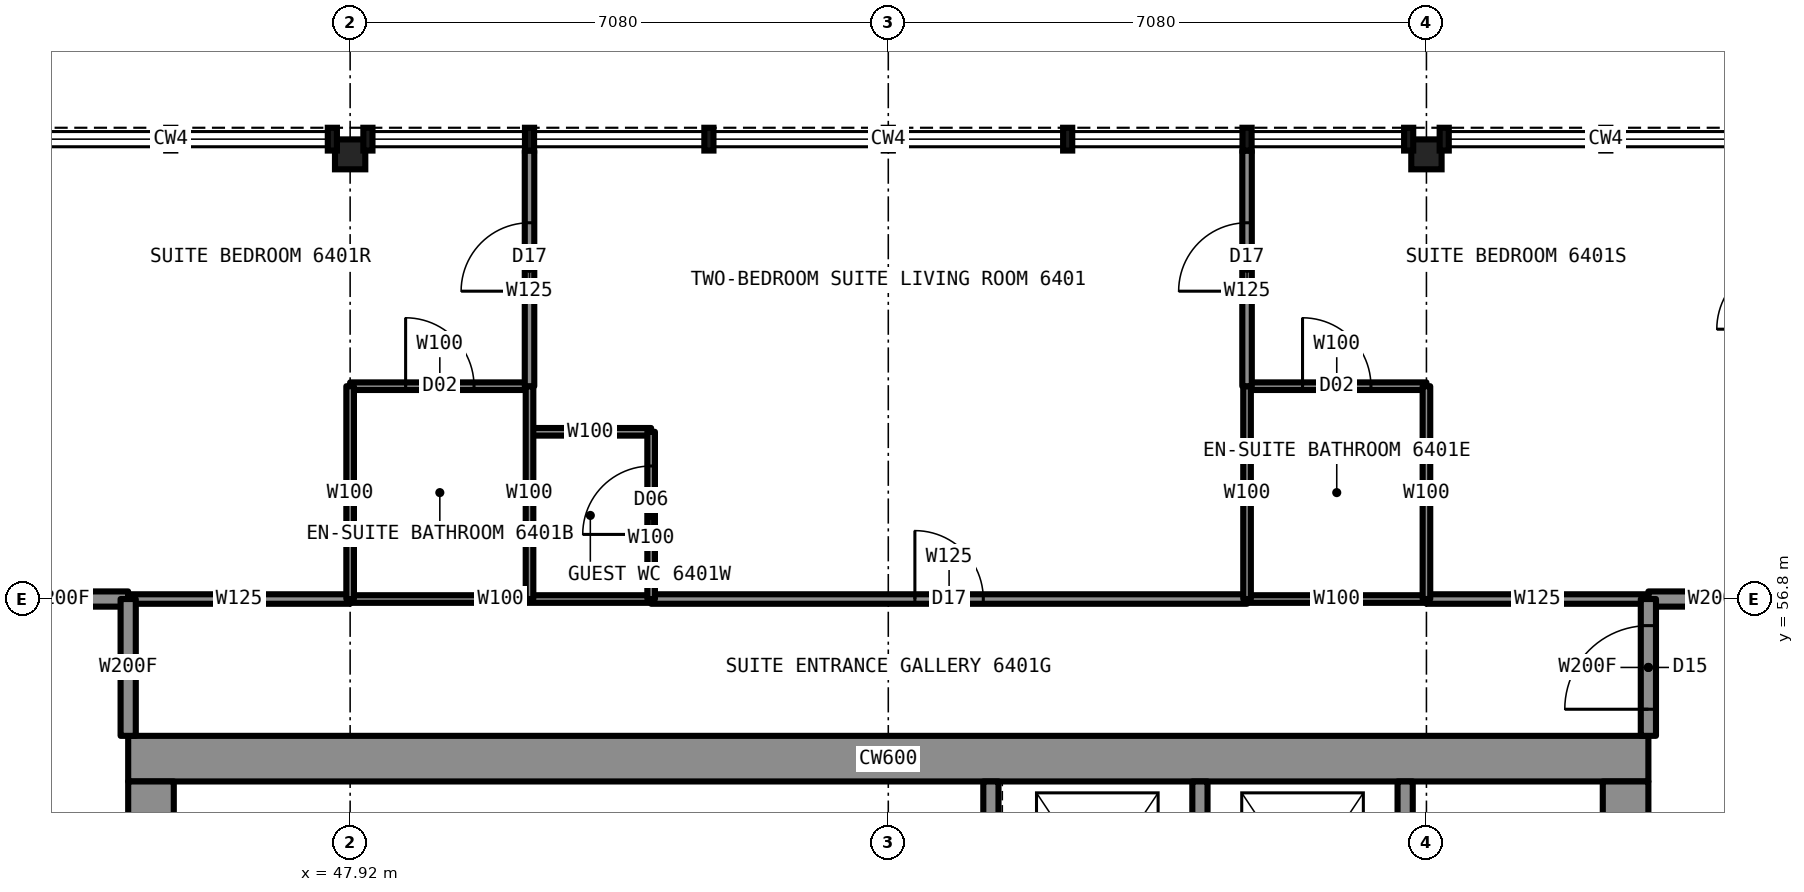
"""IFC4 building model, lengths in metres.
Left out: names, types, materials, properties, quantities, classifications, styles, units other than length and angle.
Written with IfcOpenShell. Run it as: python <this file> out.ifc"""

import sys

from ifc_helpers import new_model, si_unit, direction, frame, frame_2d, origin, origin_2d, place, context, subcontext, project, spatial, rectangle, i_section, extrude, element, fill, save


model = new_model("IFC4")
c1 = context("Model", 3, precision=1e-05, world=origin(), true_north=direction((0.0, 1.0)))
c2 = subcontext(c1, "Body", "Model", "MODEL_VIEW")
j1 = project(units=[si_unit("LENGTHUNIT", "METRE"), si_unit("PLANEANGLEUNIT", "RADIAN")], contexts=[c1])
p1 = place(None, origin())
s1 = spatial("IfcSite", under=j1, at=p1, CompositionType="ELEMENT")
p2 = place(p1, origin())
s2 = spatial("IfcBuilding", under=s1, at=p2, CompositionType="ELEMENT")
p3 = place(p2, frame((0.0, 0.0, 237.2)))
s3 = spatial("IfcBuildingStorey", under=s2, at=p3, CompositionType="ELEMENT", Elevation=237.2)
for number, where, z_axis, x_axis in (
    (1, (47.92, 62.65, 0.0), (0.0, 0.0, 1.0), (1.0, 0.0, 0.0)),
    (2, (62.08, 62.65, 0.0), (0.0, 0.0, 1.0), (1.0, 0.0, 0.0)),
):
    element("IfcColumn", number, at=place(p3, frame(where, z_axis=z_axis, x_axis=x_axis)), inside=s3, PredefinedType="COLUMN", context=c2, shape_type="SweptSolid", body=[
        extrude(i_section(OverallWidth=0.399, OverallDepth=0.394, WebThickness=0.023, FlangeThickness=0.037, at=origin_2d()), origin(), (0.0, 0.0, 1.0), 3.5),
    ])
p4 = place(p3, frame((45.0, 54.7, 0.0), z_axis=(0.0, 0.0, 1.0), x_axis=(1.0, 0.0, 0.0)))
e3 = element("IfcWall", 3, at=p4, inside=s3, PredefinedType="SHEAR", context=c2, shape_type="SweptSolid", body=[
    extrude(rectangle(XDim=20.0, YDim=0.6, at=frame_2d((10.0, 0.0))), origin(), (0.0, 0.0, 1.0), 3.5),
])
p5 = place(p3, frame((64.7, 35.6, 0.0), z_axis=(0.0, 0.0, 1.0), x_axis=(0.0, 1.0, 0.0)))
e4 = element("IfcWall", 4, at=p5, inside=s3, PredefinedType="SHEAR", context=c2, shape_type="SweptSolid", body=[
    extrude(rectangle(XDim=18.8, YDim=0.6, at=frame_2d((9.4, 0.0))), origin(), (0.0, 0.0, 1.0), 3.5),
])
p6 = place(p5, frame((13.4, 0.0, 0.0)))
e5 = element("IfcOpeningElement", 5, at=p6, cuts=e4, PredefinedType="OPENING", context=c2, shape_type="SweptSolid", body=[
    extrude(rectangle(XDim=1.8, YDim=2.2, at=frame_2d((0.9, 1.1))), frame((0.0, 0.31, 0.0), z_axis=(0.0, -1.0, 0.0), x_axis=(1.0, 0.0, 0.0)), (0.0, 0.0, 1.0), 0.62),
])
p7 = place(p5, frame((3.6, 0.0, 0.0)))
e6 = element("IfcOpeningElement", 6, at=p7, cuts=e4, PredefinedType="OPENING", context=c2, shape_type="SweptSolid", body=[
    extrude(rectangle(XDim=1.8, YDim=2.2, at=frame_2d((0.9, 1.1))), frame((0.0, 0.31, 0.0), z_axis=(0.0, -1.0, 0.0), x_axis=(1.0, 0.0, 0.0)), (0.0, 0.0, 1.0), 0.62),
])
p8 = place(p3, frame((45.3, 35.6, 0.0), z_axis=(0.0, 0.0, 1.0), x_axis=(0.0, 1.0, 0.0)))
e7 = element("IfcWall", 7, at=p8, inside=s3, PredefinedType="SHEAR", context=c2, shape_type="SweptSolid", body=[
    extrude(rectangle(XDim=18.8, YDim=0.6, at=frame_2d((9.4, 0.0))), origin(), (0.0, 0.0, 1.0), 3.5),
])
p9 = place(p8, frame((13.4, 0.0, 0.0)))
e8 = element("IfcOpeningElement", 8, at=p9, cuts=e7, PredefinedType="OPENING", context=c2, shape_type="SweptSolid", body=[
    extrude(rectangle(XDim=1.8, YDim=2.2, at=frame_2d((0.9, 1.1))), frame((0.0, 0.31, 0.0), z_axis=(0.0, -1.0, 0.0), x_axis=(1.0, 0.0, 0.0)), (0.0, 0.0, 1.0), 0.62),
])
p10 = place(p8, frame((3.6, 0.0, 0.0)))
e9 = element("IfcOpeningElement", 9, at=p10, cuts=e7, PredefinedType="OPENING", context=c2, shape_type="SweptSolid", body=[
    extrude(rectangle(XDim=1.8, YDim=2.2, at=frame_2d((0.9, 1.1))), frame((0.0, 0.31, 0.0), z_axis=(0.0, -1.0, 0.0), x_axis=(1.0, 0.0, 0.0)), (0.0, 0.0, 1.0), 0.62),
])
p11 = place(p8, frame((6.4, 0.0, 0.0)))
e10 = element("IfcOpeningElement", 10, at=p11, cuts=e7, PredefinedType="OPENING", context=c2, shape_type="SweptSolid", body=[
    extrude(rectangle(XDim=1.2, YDim=2.2, at=frame_2d((0.6, 1.1))), frame((0.0, 0.31, 0.0), z_axis=(0.0, -1.0, 0.0), x_axis=(1.0, 0.0, 0.0)), (0.0, 0.0, 1.0), 0.62),
])
p12 = place(p3, frame((47.92, 56.8, 0.0), z_axis=(0.0, 0.0, 1.0), x_axis=(1.0, 0.0, 0.0)))
e11 = element("IfcWall", 11, at=p12, inside=s3, PredefinedType="PARTITIONING", context=c2, shape_type="SweptSolid", body=[
    extrude(rectangle(XDim=3.96, YDim=0.1, at=frame_2d((1.98, 0.0))), origin(), (0.0, 0.0, 1.0), 3.33),
])
p13 = place(p3, frame((59.72, 56.8, 0.0), z_axis=(0.0, 0.0, 1.0), x_axis=(1.0, 0.0, 0.0)))
e12 = element("IfcWall", 12, at=p13, inside=s3, PredefinedType="PARTITIONING", context=c2, shape_type="SweptSolid", body=[
    extrude(rectangle(XDim=2.36, YDim=0.1, at=frame_2d((1.18, 0.0))), origin(), (0.0, 0.0, 1.0), 3.33),
])
p14 = place(p3, frame((43.22, 56.8, 0.0), z_axis=(0.0, 0.0, 1.0), x_axis=(1.0, 0.0, 0.0)))
e13 = element("IfcWall", 13, at=p14, inside=s3, PredefinedType="PARTITIONING", context=c2, shape_type="SweptSolid", body=[
    extrude(rectangle(XDim=1.78, YDim=0.2, at=frame_2d((0.89, 0.0))), origin(), (0.0, 0.0, 1.0), 3.33),
])
p15 = place(p3, frame((65.0, 56.8, 0.0), z_axis=(0.0, 0.0, 1.0), x_axis=(1.0, 0.0, 0.0)))
e14 = element("IfcWall", 14, at=p15, inside=s3, PredefinedType="PARTITIONING", context=c2, shape_type="SweptSolid", body=[
    extrude(rectangle(XDim=1.8, YDim=0.2, at=frame_2d((0.9, 0.0))), origin(), (0.0, 0.0, 1.0), 3.33),
])
p16 = place(p3, frame((45.0, 56.8, 0.0), z_axis=(0.0, 0.0, 1.0), x_axis=(1.0, 0.0, 0.0)))
e15 = element("IfcWall", 15, at=p16, inside=s3, PredefinedType="PARTITIONING", context=c2, shape_type="SweptSolid", body=[
    extrude(rectangle(XDim=2.92, YDim=0.125, at=frame_2d((1.46, 0.0))), origin(), (0.0, 0.0, 1.0), 3.33),
])
p17 = place(p3, frame((51.88, 56.8, 0.0), z_axis=(0.0, 0.0, 1.0), x_axis=(1.0, 0.0, 0.0)))
e16 = element("IfcWall", 16, at=p17, inside=s3, PredefinedType="PARTITIONING", context=c2, shape_type="SweptSolid", body=[
    extrude(rectangle(XDim=7.84, YDim=0.125, at=frame_2d((3.92, 0.0))), origin(), (0.0, 0.0, 1.0), 3.33),
])
p18 = place(p17, frame((3.47, 0.0, 0.0)))
e17 = element("IfcOpeningElement", 17, at=p18, cuts=e16, PredefinedType="OPENING", context=c2, shape_type="SweptSolid", body=[
    extrude(rectangle(XDim=0.9, YDim=2.2, at=frame_2d((0.45, 1.1))), frame((0.0, 0.073, 0.0), z_axis=(0.0, -1.0, 0.0), x_axis=(1.0, 0.0, 0.0)), (0.0, 0.0, 1.0), 0.145),
])
p19 = place(p3, frame((62.08, 56.8, 0.0), z_axis=(0.0, 0.0, 1.0), x_axis=(1.0, 0.0, 0.0)))
e18 = element("IfcWall", 18, at=p19, inside=s3, PredefinedType="PARTITIONING", context=c2, shape_type="SweptSolid", body=[
    extrude(rectangle(XDim=2.92, YDim=0.125, at=frame_2d((1.46, 0.0))), origin(), (0.0, 0.0, 1.0), 3.33),
])
p20 = place(p3, frame((50.28, 59.0, 0.0), z_axis=(0.0, 0.0, 1.0), x_axis=(1.0, 0.0, 0.0)))
e19 = element("IfcWall", 19, at=p20, inside=s3, PredefinedType="PARTITIONING", context=c2, shape_type="SweptSolid", body=[
    extrude(rectangle(XDim=1.6, YDim=0.1, at=frame_2d((0.8, 0.0))), origin(), (0.0, 0.0, 1.0), 3.33),
])
p21 = place(p3, frame((47.92, 59.6, 0.0), z_axis=(0.0, 0.0, 1.0), x_axis=(1.0, 0.0, 0.0)))
e20 = element("IfcWall", 20, at=p21, inside=s3, PredefinedType="PARTITIONING", context=c2, shape_type="SweptSolid", body=[
    extrude(rectangle(XDim=2.36, YDim=0.1, at=frame_2d((1.18, 0.0))), origin(), (0.0, 0.0, 1.0), 3.33),
])
p22 = place(p21, frame((0.73, 0.0, 0.0)))
e21 = element("IfcOpeningElement", 21, at=p22, cuts=e20, PredefinedType="OPENING", context=c2, shape_type="SweptSolid", body=[
    extrude(rectangle(XDim=0.9, YDim=2.1, at=frame_2d((0.45, 1.05))), frame((0.0, 0.06, 0.0), z_axis=(0.0, -1.0, 0.0), x_axis=(1.0, 0.0, 0.0)), (0.0, 0.0, 1.0), 0.12),
])
p23 = place(p3, frame((59.72, 59.6, 0.0), z_axis=(0.0, 0.0, 1.0), x_axis=(1.0, 0.0, 0.0)))
e22 = element("IfcWall", 22, at=p23, inside=s3, PredefinedType="PARTITIONING", context=c2, shape_type="SweptSolid", body=[
    extrude(rectangle(XDim=2.36, YDim=0.1, at=frame_2d((1.18, 0.0))), origin(), (0.0, 0.0, 1.0), 3.33),
])
p24 = place(p23, frame((0.73, 0.0, 0.0)))
e23 = element("IfcOpeningElement", 23, at=p24, cuts=e22, PredefinedType="OPENING", context=c2, shape_type="SweptSolid", body=[
    extrude(rectangle(XDim=0.9, YDim=2.1, at=frame_2d((0.45, 1.05))), frame((0.0, 0.06, 0.0), z_axis=(0.0, -1.0, 0.0), x_axis=(1.0, 0.0, 0.0)), (0.0, 0.0, 1.0), 0.12),
])
p25 = place(p3, frame((45.0, 55.0, 0.0), z_axis=(0.0, 0.0, 1.0), x_axis=(0.0, 1.0, 0.0)))
e24 = element("IfcWall", 24, at=p25, inside=s3, PredefinedType="PARTITIONING", context=c2, shape_type="SweptSolid", body=[
    extrude(rectangle(XDim=1.8, YDim=0.2, at=frame_2d((0.9, 0.0))), origin(), (0.0, 0.0, 1.0), 3.33),
])
p26 = place(p3, frame((51.88, 56.8, 0.0), z_axis=(0.0, 0.0, 1.0), x_axis=(0.0, 1.0, 0.0)))
e25 = element("IfcWall", 25, at=p26, inside=s3, PredefinedType="PARTITIONING", context=c2, shape_type="SweptSolid", body=[
    extrude(rectangle(XDim=2.2, YDim=0.1, at=frame_2d((1.1, 0.0))), origin(), (0.0, 0.0, 1.0), 3.33),
])
p27 = place(p26, frame((0.85, 0.0, 0.0)))
e26 = element("IfcOpeningElement", 26, at=p27, cuts=e25, PredefinedType="OPENING", context=c2, shape_type="SweptSolid", body=[
    extrude(rectangle(XDim=0.9, YDim=2.1, at=frame_2d((0.45, 1.05))), frame((0.0, 0.06, 0.0), z_axis=(0.0, -1.0, 0.0), x_axis=(1.0, 0.0, 0.0)), (0.0, 0.0, 1.0), 0.12),
])
p28 = place(p3, frame((50.28, 56.8, 0.0), z_axis=(0.0, 0.0, 1.0), x_axis=(0.0, 1.0, 0.0)))
e27 = element("IfcWall", 27, at=p28, inside=s3, PredefinedType="PARTITIONING", context=c2, shape_type="SweptSolid", body=[
    extrude(rectangle(XDim=2.8, YDim=0.1, at=frame_2d((1.4, 0.0))), origin(), (0.0, 0.0, 1.0), 3.33),
])
p29 = place(p3, frame((50.28, 59.6, 0.0), z_axis=(0.0, 0.0, 1.0), x_axis=(0.0, 1.0, 0.0)))
e28 = element("IfcWall", 28, at=p29, inside=s3, PredefinedType="PARTITIONING", context=c2, shape_type="SweptSolid", body=[
    extrude(rectangle(XDim=3.1, YDim=0.125, at=frame_2d((1.55, 0.0))), origin(), (0.0, 0.0, 1.0), 3.33),
])
p30 = place(p29, frame((1.25, 0.0, 0.0)))
e29 = element("IfcOpeningElement", 29, at=p30, cuts=e28, PredefinedType="OPENING", context=c2, shape_type="SweptSolid", body=[
    extrude(rectangle(XDim=0.9, YDim=2.2, at=frame_2d((0.45, 1.1))), frame((0.0, 0.073, 0.0), z_axis=(0.0, -1.0, 0.0), x_axis=(1.0, 0.0, 0.0)), (0.0, 0.0, 1.0), 0.145),
])
p31 = place(p3, frame((47.92, 56.8, 0.0), z_axis=(0.0, 0.0, 1.0), x_axis=(0.0, 1.0, 0.0)))
e30 = element("IfcWall", 30, at=p31, inside=s3, PredefinedType="PARTITIONING", context=c2, shape_type="SweptSolid", body=[
    extrude(rectangle(XDim=2.8, YDim=0.1, at=frame_2d((1.4, 0.0))), origin(), (0.0, 0.0, 1.0), 2.573),
])
p32 = place(p3, frame((65.0, 55.0, 0.0), z_axis=(0.0, 0.0, 1.0), x_axis=(0.0, 1.0, 0.0)))
e31 = element("IfcWall", 31, at=p32, inside=s3, PredefinedType="PARTITIONING", context=c2, shape_type="SweptSolid", body=[
    extrude(rectangle(XDim=1.8, YDim=0.2, at=frame_2d((0.9, 0.0))), origin(), (0.0, 0.0, 1.0), 3.33),
])
p33 = place(p32, frame((0.35, 0.0, 0.0)))
e32 = element("IfcOpeningElement", 32, at=p33, cuts=e31, PredefinedType="OPENING", context=c2, shape_type="SweptSolid", body=[
    extrude(rectangle(XDim=1.1, YDim=2.2, at=frame_2d((0.55, 1.1))), frame((0.0, 0.11, 0.0), z_axis=(0.0, -1.0, 0.0), x_axis=(1.0, 0.0, 0.0)), (0.0, 0.0, 1.0), 0.22),
])
p34 = place(p3, frame((59.72, 56.8, 0.0), z_axis=(0.0, 0.0, 1.0), x_axis=(0.0, 1.0, 0.0)))
e33 = element("IfcWall", 33, at=p34, inside=s3, PredefinedType="PARTITIONING", context=c2, shape_type="SweptSolid", body=[
    extrude(rectangle(XDim=2.8, YDim=0.1, at=frame_2d((1.4, 0.0))), origin(), (0.0, 0.0, 1.0), 3.33),
])
p35 = place(p3, frame((59.72, 59.6, 0.0), z_axis=(0.0, 0.0, 1.0), x_axis=(0.0, 1.0, 0.0)))
e34 = element("IfcWall", 34, at=p35, inside=s3, PredefinedType="PARTITIONING", context=c2, shape_type="SweptSolid", body=[
    extrude(rectangle(XDim=3.1, YDim=0.125, at=frame_2d((1.55, 0.0))), origin(), (0.0, 0.0, 1.0), 3.33),
])
p36 = place(p35, frame((1.25, 0.0, 0.0)))
e35 = element("IfcOpeningElement", 35, at=p36, cuts=e34, PredefinedType="OPENING", context=c2, shape_type="SweptSolid", body=[
    extrude(rectangle(XDim=0.9, YDim=2.2, at=frame_2d((0.45, 1.1))), frame((0.0, 0.073, 0.0), z_axis=(0.0, -1.0, 0.0), x_axis=(1.0, 0.0, 0.0)), (0.0, 0.0, 1.0), 0.145),
])
p37 = place(p3, frame((62.08, 56.8, 0.0), z_axis=(0.0, 0.0, 1.0), x_axis=(0.0, 1.0, 0.0)))
e36 = element("IfcWall", 36, at=p37, inside=s3, PredefinedType="PARTITIONING", context=c2, shape_type="SweptSolid", body=[
    extrude(rectangle(XDim=2.8, YDim=0.1, at=frame_2d((1.4, 0.0))), origin(), (0.0, 0.0, 1.0), 2.573),
])
for number, where, z_axis, x_axis in (
    (37, (59.1, 51.7, 0.0), (0.0, 0.0, 1.0), (0.0, 1.0, 0.0)),
    (38, (61.8, 51.7, 0.0), (0.0, 0.0, 1.0), (0.0, 1.0, 0.0)),
    (39, (56.35, 51.7, 0.0), (0.0, 0.0, 1.0), (0.0, 1.0, 0.0)),
):
    element("IfcWall", number, at=place(p3, frame(where, z_axis=z_axis, x_axis=x_axis)), inside=s3, PredefinedType="PARTITIONING", context=c2, shape_type="SweptSolid", body=[
        extrude(rectangle(XDim=2.7, YDim=0.2, at=frame_2d((1.35, 0.0))), origin(), (0.0, 0.0, 1.0), 3.33),
    ])
p38 = place(p18, origin())
e40 = element("IfcDoor", 40, at=p38, inside=s3, OperationType="SINGLE_SWING_LEFT", PredefinedType="DOOR", context=c2, shape_type="SweptSolid", body=[
    extrude(rectangle(XDim=0.9, YDim=2.2, at=frame_2d((0.45, 1.1))), frame((0.0, 0.025, 0.0), z_axis=(0.0, -1.0, 0.0), x_axis=(1.0, 0.0, 0.0)), (0.0, 0.0, 1.0), 0.05),
])
fill(e17, e40)
p39 = place(p22, origin())
e41 = element("IfcDoor", 41, at=p39, inside=s3, OperationType="SINGLE_SWING_RIGHT", PredefinedType="DOOR", context=c2, shape_type="SweptSolid", body=[
    extrude(rectangle(XDim=0.9, YDim=2.1, at=frame_2d((0.45, 1.05))), frame((0.0, 0.025, 0.0), z_axis=(0.0, -1.0, 0.0), x_axis=(1.0, 0.0, 0.0)), (0.0, 0.0, 1.0), 0.05),
])
fill(e21, e41)
p40 = place(p24, origin())
e42 = element("IfcDoor", 42, at=p40, inside=s3, OperationType="SINGLE_SWING_RIGHT", PredefinedType="DOOR", context=c2, shape_type="SweptSolid", body=[
    extrude(rectangle(XDim=0.9, YDim=2.1, at=frame_2d((0.45, 1.05))), frame((0.0, 0.025, 0.0), z_axis=(0.0, -1.0, 0.0), x_axis=(1.0, 0.0, 0.0)), (0.0, 0.0, 1.0), 0.05),
])
fill(e23, e42)
p41 = place(p33, origin())
e43 = element("IfcDoor", 43, at=p41, inside=s3, OperationType="SINGLE_SWING_LEFT", PredefinedType="DOOR", context=c2, shape_type="SweptSolid", body=[
    extrude(rectangle(XDim=1.1, YDim=2.2, at=frame_2d((0.55, 1.1))), frame((0.0, 0.025, 0.0), z_axis=(0.0, -1.0, 0.0), x_axis=(1.0, 0.0, 0.0)), (0.0, 0.0, 1.0), 0.05),
])
fill(e32, e43)
p42 = place(p30, origin())
e44 = element("IfcDoor", 44, at=p42, inside=s3, OperationType="SINGLE_SWING_LEFT", PredefinedType="DOOR", context=c2, shape_type="SweptSolid", body=[
    extrude(rectangle(XDim=0.9, YDim=2.2, at=frame_2d((0.45, 1.1))), frame((0.0, 0.025, 0.0), z_axis=(0.0, -1.0, 0.0), x_axis=(1.0, 0.0, 0.0)), (0.0, 0.0, 1.0), 0.05),
])
fill(e29, e44)
p43 = place(p36, origin())
e45 = element("IfcDoor", 45, at=p43, inside=s3, OperationType="SINGLE_SWING_LEFT", PredefinedType="DOOR", context=c2, shape_type="SweptSolid", body=[
    extrude(rectangle(XDim=0.9, YDim=2.2, at=frame_2d((0.45, 1.1))), frame((0.0, 0.025, 0.0), z_axis=(0.0, -1.0, 0.0), x_axis=(1.0, 0.0, 0.0)), (0.0, 0.0, 1.0), 0.05),
])
fill(e35, e45)
p44 = place(p27, origin())
e46 = element("IfcDoor", 46, at=p44, inside=s3, OperationType="SINGLE_SWING_LEFT", PredefinedType="DOOR", context=c2, shape_type="SweptSolid", body=[
    extrude(rectangle(XDim=0.9, YDim=2.1, at=frame_2d((0.45, 1.05))), frame((0.0, 0.025, 0.0), z_axis=(0.0, -1.0, 0.0), x_axis=(1.0, 0.0, 0.0)), (0.0, 0.0, 1.0), 0.05),
])
fill(e26, e46)
save(model, sys.argv[1])
